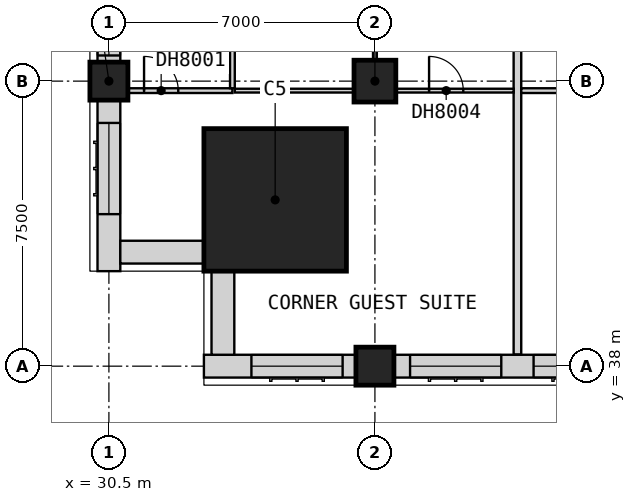
"""IFC4 building model, lengths in metres.
Left out: names, types, materials, properties, quantities, classifications, styles, units other than length and angle.
Written with IfcOpenShell. Run it as: python <this file> out.ifc"""

import sys

from ifc_helpers import new_model, si_unit, direction, frame, frame_2d, origin, origin_2d, place, context, subcontext, project, spatial, rectangle, extrude, element, fill, save


model = new_model("IFC4")
c1 = context("Model", 3, precision=1e-05, world=origin(), true_north=direction((0.0, 1.0)))
c2 = subcontext(c1, "Body", "Model", "MODEL_VIEW")
j1 = project(units=[si_unit("LENGTHUNIT", "METRE"), si_unit("PLANEANGLEUNIT", "RADIAN")], contexts=[c1])
p1 = place(None, origin())
s1 = spatial("IfcSite", under=j1, at=p1, CompositionType="ELEMENT")
p2 = place(p1, origin())
s2 = spatial("IfcBuilding", under=s1, at=p2, CompositionType="ELEMENT")
p3 = place(p2, frame((0.0, 0.0, 89.9)))
s3 = spatial("IfcBuildingStorey", under=s2, at=p3, CompositionType="ELEMENT", Elevation=89.9)
for number, where, z_axis, x_axis in (
    (1, (30.5, 45.5, 0.0), (0.0, 0.0, 1.0), (1.0, 0.0, 0.0)),
    (2, (37.5, 38.0, 0.0), (0.0, 0.0, 1.0), (1.0, 0.0, 0.0)),
):
    element("IfcColumn", number, at=place(p3, frame(where, z_axis=z_axis, x_axis=x_axis)), inside=s3, PredefinedType="COLUMN", context=c2, shape_type="SweptSolid", body=[
        extrude(rectangle(XDim=1.0, YDim=1.0, at=origin_2d()), origin(), (0.0, 0.0, 1.0), 3.6),
    ])
p4 = place(p3, frame((37.5, 45.5, 0.0), z_axis=(0.0, 0.0, 1.0), x_axis=(1.0, 0.0, 0.0)))
e3 = element("IfcColumn", 3, at=p4, inside=s3, PredefinedType="COLUMN", context=c2, shape_type="SweptSolid", body=[
    extrude(rectangle(XDim=1.1, YDim=1.1, at=origin_2d()), origin(), (0.0, 0.0, 1.0), 3.6),
])
p5 = place(p3, frame((34.875, 42.375, 0.0), z_axis=(0.0, 0.0, 1.0), x_axis=(1.0, 0.0, 0.0)))
e4 = element("IfcColumn", 4, at=p5, inside=s3, PredefinedType="COLUMN", context=c2, shape_type="SweptSolid", body=[
    extrude(rectangle(XDim=3.75, YDim=3.75, at=origin_2d()), origin(), (0.0, 0.0, 1.0), 3.6),
])
p6 = place(p3, frame((33.0, 38.0, 0.0), z_axis=(0.0, 0.0, 1.0), x_axis=(1.0, 0.0, 0.0)))
e5 = element("IfcWall", 5, at=p6, inside=s3, PredefinedType="SOLIDWALL", context=c2, shape_type="SweptSolid", body=[
    extrude(rectangle(XDim=4.0, YDim=0.6, at=frame_2d((2.0, 0.0))), origin(), (0.0, 0.0, 1.0), 3.35),
])
p7 = place(p6, frame((1.25, 0.0, 0.8)))
e6 = element("IfcOpeningElement", 6, at=p7, cuts=e5, PredefinedType="OPENING", context=c2, shape_type="SweptSolid", body=[
    extrude(rectangle(XDim=2.4, YDim=1.8, at=frame_2d((1.2, 0.9))), frame((0.0, 0.31, 0.0), z_axis=(0.0, -1.0, 0.0), x_axis=(1.0, 0.0, 0.0)), (0.0, 0.0, 1.0), 0.62),
])
p8 = place(p3, frame((38.0, 38.0, 0.0), z_axis=(0.0, 0.0, 1.0), x_axis=(1.0, 0.0, 0.0)))
e7 = element("IfcWall", 7, at=p8, inside=s3, PredefinedType="SOLIDWALL", context=c2, shape_type="SweptSolid", body=[
    extrude(rectangle(XDim=6.5, YDim=0.6, at=frame_2d((3.25, 0.0))), origin(), (0.0, 0.0, 1.0), 2.85),
])
p9 = place(p8, frame((0.425, 0.0, 0.8)))
e8 = element("IfcOpeningElement", 8, at=p9, cuts=e7, PredefinedType="OPENING", context=c2, shape_type="SweptSolid", body=[
    extrude(rectangle(XDim=2.4, YDim=1.8, at=frame_2d((1.2, 0.9))), frame((0.0, 0.31, 0.0), z_axis=(0.0, -1.0, 0.0), x_axis=(1.0, 0.0, 0.0)), (0.0, 0.0, 1.0), 0.62),
])
p10 = place(p8, frame((3.675, 0.0, 0.8)))
e9 = element("IfcOpeningElement", 9, at=p10, cuts=e7, PredefinedType="OPENING", context=c2, shape_type="SweptSolid", body=[
    extrude(rectangle(XDim=2.4, YDim=1.8, at=frame_2d((1.2, 0.9))), frame((0.0, 0.31, 0.0), z_axis=(0.0, -1.0, 0.0), x_axis=(1.0, 0.0, 0.0)), (0.0, 0.0, 1.0), 0.62),
])
p11 = place(p3, frame((30.5, 52.0, 0.0), z_axis=(0.0, 0.0, 1.0), x_axis=(0.0, -1.0, 0.0)))
e10 = element("IfcWall", 10, at=p11, inside=s3, PredefinedType="SOLIDWALL", context=c2, shape_type="SweptSolid", body=[
    extrude(rectangle(XDim=6.0, YDim=0.6, at=frame_2d((3.0, 0.0))), origin(), (0.0, 0.0, 1.0), 2.85),
])
p12 = place(p11, frame((3.425, 0.0, 0.8)))
e11 = element("IfcOpeningElement", 11, at=p12, cuts=e10, PredefinedType="OPENING", context=c2, shape_type="SweptSolid", body=[
    extrude(rectangle(XDim=2.4, YDim=1.8, at=frame_2d((1.2, 0.9))), frame((0.0, 0.31, 0.0), z_axis=(0.0, -1.0, 0.0), x_axis=(1.0, 0.0, 0.0)), (0.0, 0.0, 1.0), 0.62),
])
p13 = place(p11, frame((0.425, 0.0, 0.8)))
e12 = element("IfcOpeningElement", 12, at=p13, cuts=e10, PredefinedType="OPENING", context=c2, shape_type="SweptSolid", body=[
    extrude(rectangle(XDim=2.4, YDim=1.8, at=frame_2d((1.2, 0.9))), frame((0.0, 0.31, 0.0), z_axis=(0.0, -1.0, 0.0), x_axis=(1.0, 0.0, 0.0)), (0.0, 0.0, 1.0), 0.62),
])
p14 = place(p3, frame((30.5, 45.0, 0.0), z_axis=(0.0, 0.0, 1.0), x_axis=(0.0, -1.0, 0.0)))
e13 = element("IfcWall", 13, at=p14, inside=s3, PredefinedType="SOLIDWALL", context=c2, shape_type="SweptSolid", body=[
    extrude(rectangle(XDim=4.5, YDim=0.6, at=frame_2d((2.25, 0.0))), origin(), (0.0, 0.0, 1.0), 2.85),
])
p15 = place(p14, frame((0.6, 0.0, 0.8)))
e14 = element("IfcOpeningElement", 14, at=p15, cuts=e13, PredefinedType="OPENING", context=c2, shape_type="SweptSolid", body=[
    extrude(rectangle(XDim=2.4, YDim=1.8, at=frame_2d((1.2, 0.9))), frame((0.0, 0.31, 0.0), z_axis=(0.0, -1.0, 0.0), x_axis=(1.0, 0.0, 0.0)), (0.0, 0.0, 1.0), 0.62),
])
for number, where, z_axis, x_axis in (
    (15, (30.8, 41.0, 0.0), (0.0, 0.0, 1.0), (1.0, 0.0, 0.0)),
    (16, (33.5, 40.5, 0.0), (0.0, 0.0, 1.0), (0.0, -1.0, 0.0)),
):
    element("IfcWall", number, at=place(p3, frame(where, z_axis=z_axis, x_axis=x_axis)), inside=s3, PredefinedType="SOLIDWALL", context=c2, shape_type="SweptSolid", body=[
        extrude(rectangle(XDim=2.2, YDim=0.6, at=frame_2d((1.1, 0.0))), origin(), (0.0, 0.0, 1.0), 3.35),
    ])
p16 = place(p3, frame((41.25, 38.31, 0.0), z_axis=(0.0, 0.0, 1.0), x_axis=(0.0, 1.0, 0.0)))
e17 = element("IfcWall", 17, at=p16, inside=s3, PredefinedType="PARTITIONING", context=c2, shape_type="SweptSolid", body=[
    extrude(rectangle(XDim=11.715, YDim=0.2, at=frame_2d((5.857, 0.0))), origin(), (0.0, 0.0, 1.0), 3.35),
])
p17 = place(p3, frame((33.812, 45.25, 0.0), z_axis=(0.0, 0.0, 1.0), x_axis=(1.0, 0.0, 0.0)))
e18 = element("IfcWall", 18, at=p17, inside=s3, PredefinedType="PARTITIONING", context=c2, shape_type="SweptSolid", body=[
    extrude(rectangle(XDim=7.337, YDim=0.1, at=frame_2d((3.669, 0.0))), origin(), (0.0, 0.0, 1.0), 3.35),
])
p18 = place(p17, frame((5.113, 0.0, 0.0)))
e19 = element("IfcOpeningElement", 19, at=p18, cuts=e18, PredefinedType="OPENING", context=c2, shape_type="SweptSolid", body=[
    extrude(rectangle(XDim=0.9, YDim=2.1, at=frame_2d((0.45, 1.05))), frame((0.0, 0.06, 0.0), z_axis=(0.0, -1.0, 0.0), x_axis=(1.0, 0.0, 0.0)), (0.0, 0.0, 1.0), 0.12),
])
p19 = place(p3, frame((37.5, 45.3, 0.0), z_axis=(0.0, 0.0, 1.0), x_axis=(0.0, 1.0, 0.0)))
e20 = element("IfcWall", 20, at=p19, inside=s3, PredefinedType="PARTITIONING", context=c2, shape_type="SweptSolid", body=[
    extrude(rectangle(XDim=4.725, YDim=0.1, at=frame_2d((2.362, 0.0))), origin(), (0.0, 0.0, 1.0), 3.35),
])
p20 = place(p19, frame((1.925, 0.0, 0.0)))
e21 = element("IfcOpeningElement", 21, at=p20, cuts=e20, PredefinedType="OPENING", context=c2, shape_type="SweptSolid", body=[
    extrude(rectangle(XDim=0.9, YDim=2.1, at=frame_2d((0.45, 1.05))), frame((0.0, 0.06, 0.0), z_axis=(0.0, -1.0, 0.0), x_axis=(1.0, 0.0, 0.0)), (0.0, 0.0, 1.0), 0.12),
])
p21 = place(p3, frame((30.0, 45.25, 0.0), z_axis=(0.0, 0.0, 1.0), x_axis=(1.0, 0.0, 0.0)))
e22 = element("IfcWall", 22, at=p21, inside=s3, PredefinedType="PARTITIONING", context=c2, shape_type="SweptSolid", body=[
    extrude(rectangle(XDim=3.75, YDim=0.125, at=frame_2d((1.875, 0.0))), origin(), (0.0, 0.0, 1.0), 3.35),
])
p22 = place(p21, frame((1.425, 0.0, 0.0)))
e23 = element("IfcOpeningElement", 23, at=p22, cuts=e22, PredefinedType="OPENING", context=c2, shape_type="SweptSolid", body=[
    extrude(rectangle(XDim=0.9, YDim=2.1, at=frame_2d((0.45, 1.05))), frame((0.0, 0.073, 0.0), z_axis=(0.0, -1.0, 0.0), x_axis=(1.0, 0.0, 0.0)), (0.0, 0.0, 1.0), 0.145),
])
p23 = place(p3, frame((41.35, 45.25, 0.0), z_axis=(0.0, 0.0, 1.0), x_axis=(1.0, 0.0, 0.0)))
e24 = element("IfcWall", 24, at=p23, inside=s3, PredefinedType="PARTITIONING", context=c2, shape_type="SweptSolid", body=[
    extrude(rectangle(XDim=4.4, YDim=0.125, at=frame_2d((2.2, 0.0))), origin(), (0.0, 0.0, 1.0), 3.35),
])
p24 = place(p23, frame((1.7, 0.0, 0.0)))
e25 = element("IfcOpeningElement", 25, at=p24, cuts=e24, PredefinedType="OPENING", context=c2, shape_type="SweptSolid", body=[
    extrude(rectangle(XDim=0.9, YDim=2.1, at=frame_2d((0.45, 1.05))), frame((0.0, 0.073, 0.0), z_axis=(0.0, -1.0, 0.0), x_axis=(1.0, 0.0, 0.0)), (0.0, 0.0, 1.0), 0.145),
])
p25 = place(p3, frame((33.75, 45.312, 0.0), z_axis=(0.0, 0.0, 1.0), x_axis=(0.0, 1.0, 0.0)))
e26 = element("IfcWall", 26, at=p25, inside=s3, PredefinedType="PARTITIONING", context=c2, shape_type="SweptSolid", body=[
    extrude(rectangle(XDim=4.712, YDim=0.125, at=frame_2d((2.356, 0.0))), origin(), (0.0, 0.0, 1.0), 3.35),
])
p26 = place(p7, origin())
e27 = element("IfcWindow", 27, at=p26, inside=s3, PartitioningType="SINGLE_PANEL", PredefinedType="WINDOW", context=c2, shape_type="SweptSolid", body=[
    extrude(rectangle(XDim=2.4, YDim=1.8, at=frame_2d((1.2, 0.9))), frame((0.0, -0.07, 0.0), z_axis=(0.0, -1.0, 0.0), x_axis=(1.0, 0.0, 0.0)), (0.0, 0.0, 1.0), 0.06),
])
fill(e6, e27)
p27 = place(p9, origin())
e28 = element("IfcWindow", 28, at=p27, inside=s3, PartitioningType="SINGLE_PANEL", PredefinedType="WINDOW", context=c2, shape_type="SweptSolid", body=[
    extrude(rectangle(XDim=2.4, YDim=1.8, at=frame_2d((1.2, 0.9))), frame((0.0, -0.07, 0.0), z_axis=(0.0, -1.0, 0.0), x_axis=(1.0, 0.0, 0.0)), (0.0, 0.0, 1.0), 0.06),
])
fill(e8, e28)
p28 = place(p10, origin())
e29 = element("IfcWindow", 29, at=p28, inside=s3, PartitioningType="SINGLE_PANEL", PredefinedType="WINDOW", context=c2, shape_type="SweptSolid", body=[
    extrude(rectangle(XDim=2.4, YDim=1.8, at=frame_2d((1.2, 0.9))), frame((0.0, -0.07, 0.0), z_axis=(0.0, -1.0, 0.0), x_axis=(1.0, 0.0, 0.0)), (0.0, 0.0, 1.0), 0.06),
])
fill(e9, e29)
p29 = place(p12, origin())
e30 = element("IfcWindow", 30, at=p29, inside=s3, PartitioningType="SINGLE_PANEL", PredefinedType="WINDOW", context=c2, shape_type="SweptSolid", body=[
    extrude(rectangle(XDim=2.4, YDim=1.8, at=frame_2d((1.2, 0.9))), frame((0.0, -0.07, 0.0), z_axis=(0.0, -1.0, 0.0), x_axis=(1.0, 0.0, 0.0)), (0.0, 0.0, 1.0), 0.06),
])
fill(e11, e30)
p30 = place(p15, origin())
e31 = element("IfcWindow", 31, at=p30, inside=s3, PartitioningType="SINGLE_PANEL", PredefinedType="WINDOW", context=c2, shape_type="SweptSolid", body=[
    extrude(rectangle(XDim=2.4, YDim=1.8, at=frame_2d((1.2, 0.9))), frame((0.0, -0.07, 0.0), z_axis=(0.0, -1.0, 0.0), x_axis=(1.0, 0.0, 0.0)), (0.0, 0.0, 1.0), 0.06),
])
fill(e14, e31)
p31 = place(p22, origin())
e32 = element("IfcDoor", 32, at=p31, inside=s3, OperationType="SINGLE_SWING_LEFT", PredefinedType="DOOR", context=c2, shape_type="SweptSolid", body=[
    extrude(rectangle(XDim=0.9, YDim=2.1, at=frame_2d((0.45, 1.05))), frame((0.0, 0.025, 0.0), z_axis=(0.0, -1.0, 0.0), x_axis=(1.0, 0.0, 0.0)), (0.0, 0.0, 1.0), 0.05),
])
fill(e23, e32)
p32 = place(p18, origin())
e33 = element("IfcDoor", 33, at=p32, inside=s3, OperationType="SINGLE_SWING_LEFT", PredefinedType="DOOR", context=c2, shape_type="SweptSolid", body=[
    extrude(rectangle(XDim=0.9, YDim=2.1, at=frame_2d((0.45, 1.05))), frame((0.0, 0.025, 0.0), z_axis=(0.0, -1.0, 0.0), x_axis=(1.0, 0.0, 0.0)), (0.0, 0.0, 1.0), 0.05),
])
fill(e19, e33)
save(model, sys.argv[1])
